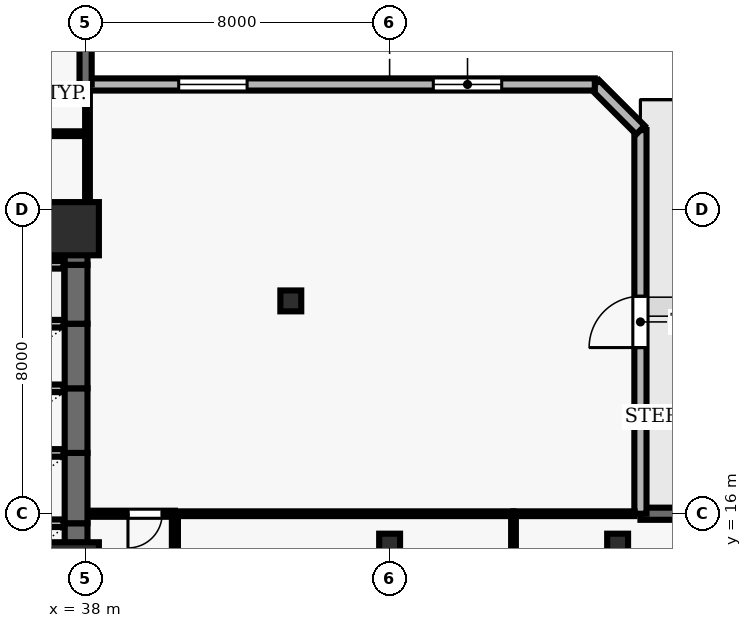
"""IFC4 building model, lengths in metres.
Left out: names, types, materials, properties, quantities, classifications, styles, units other than length and angle.
Written with IfcOpenShell. Run it as: python <this file> out.ifc"""

import sys

from ifc_helpers import new_model, si_unit, direction, frame, frame_2d, origin, origin_2d, place, context, subcontext, project, spatial, rectangle, hollow_rectangle, extrude, element, fill, save


model = new_model("IFC4")
c1 = context("Model", 3, precision=1e-05, world=origin(), true_north=direction((0.0, 1.0)))
c2 = subcontext(c1, "Body", "Model", "MODEL_VIEW")
j1 = project(units=[si_unit("LENGTHUNIT", "METRE"), si_unit("PLANEANGLEUNIT", "RADIAN")], contexts=[c1])
p1 = place(None, origin())
s1 = spatial("IfcSite", under=j1, at=p1, CompositionType="ELEMENT")
p2 = place(p1, origin())
s2 = spatial("IfcBuilding", under=s1, at=p2, CompositionType="ELEMENT")
p3 = place(p2, frame((0.0, 0.0, 50.5)))
s3 = spatial("IfcBuildingStorey", under=s2, at=p3, CompositionType="ELEMENT", Elevation=50.5)
for number, where, z_axis, x_axis in (
    (1, (37.65, 14.55, 0.0), (0.0, 0.0, 1.0), (1.0, 0.0, 0.0)),
    (2, (37.65, 23.5, 0.0), (0.0, 0.0, 1.0), (1.0, 0.0, 0.0)),
):
    element("IfcColumn", number, at=place(p3, frame(where, z_axis=z_axis, x_axis=x_axis)), inside=s3, PredefinedType="COLUMN", context=c2, shape_type="SweptSolid", body=[
        extrude(rectangle(XDim=1.4, YDim=1.4, at=origin_2d()), origin(), (0.0, 0.0, 1.0), 3.9),
    ])
for number, where, z_axis, x_axis in (
    (3, (46.0, 15.2, 0.0), (0.0, 0.0, 1.0), (1.0, 0.0, 0.0)),
    (4, (52.0, 15.2, 0.0), (0.0, 0.0, 1.0), (1.0, 0.0, 0.0)),
    (5, (43.4, 21.6, 0.0), (0.0, 0.0, 1.0), (1.0, 0.0, 0.0)),
):
    element("IfcColumn", number, at=place(p3, frame(where, z_axis=z_axis, x_axis=x_axis)), inside=s3, PredefinedType="COLUMN", context=c2, shape_type="SweptSolid", body=[
        extrude(hollow_rectangle(XDim=0.55, YDim=0.55, WallThickness=0.025, at=origin_2d()), origin(), (0.0, 0.0, 1.0), 3.9),
    ])
p4 = place(p3, frame((73.5, 16.0, 0.0), z_axis=(0.0, 0.0, 1.0), x_axis=(-1.0, 0.0, 0.0)))
e6 = element("IfcWall", 6, at=p4, inside=s3, PredefinedType="SOLIDWALL", context=c2, shape_type="SweptSolid", body=[
    extrude(rectangle(XDim=20.9, YDim=0.32, at=frame_2d((10.45, 0.0))), origin(), (0.0, 0.0, 1.0), 3.69),
])
p5 = place(p4, frame((6.925, 0.0, 0.0)))
e7 = element("IfcOpeningElement", 7, at=p5, cuts=e6, PredefinedType="OPENING", context=c2, shape_type="SweptSolid", body=[
    extrude(rectangle(XDim=1.0, YDim=2.2, at=frame_2d((0.5, 1.1))), frame((0.0, 0.17, 0.0), z_axis=(0.0, -1.0, 0.0), x_axis=(1.0, 0.0, 0.0)), (0.0, 0.0, 1.0), 0.34),
])
p6 = place(p4, frame((1.983, 0.0, 0.9)))
e8 = element("IfcOpeningElement", 8, at=p6, cuts=e6, PredefinedType="OPENING", context=c2, shape_type="SweptSolid", body=[
    extrude(rectangle(XDim=2.1, YDim=1.6, at=frame_2d((1.05, 0.8))), frame((0.0, 0.17, 0.0), z_axis=(0.0, -1.0, 0.0), x_axis=(1.0, 0.0, 0.0)), (0.0, 0.0, 1.0), 0.34),
])
p7 = place(p4, frame((16.367, 0.0, 0.9)))
e9 = element("IfcOpeningElement", 9, at=p7, cuts=e6, PredefinedType="OPENING", context=c2, shape_type="SweptSolid", body=[
    extrude(rectangle(XDim=2.1, YDim=1.6, at=frame_2d((1.05, 0.8))), frame((0.0, 0.17, 0.0), z_axis=(0.0, -1.0, 0.0), x_axis=(1.0, 0.0, 0.0)), (0.0, 0.0, 1.0), 0.34),
])
p8 = place(p3, frame((52.6, 16.0, 0.0), z_axis=(0.0, 0.0, 1.0), x_axis=(0.0, 1.0, 0.0)))
e10 = element("IfcWall", 10, at=p8, inside=s3, PredefinedType="SOLIDWALL", context=c2, shape_type="SweptSolid", body=[
    extrude(rectangle(XDim=10.095, YDim=0.32, at=frame_2d((5.047, 0.0))), origin(), (0.0, 0.0, 1.0), 3.69),
])
p9 = place(p8, frame((4.372, 0.0, 0.0)))
e11 = element("IfcOpeningElement", 11, at=p9, cuts=e10, PredefinedType="OPENING", context=c2, shape_type="SweptSolid", body=[
    extrude(rectangle(XDim=1.35, YDim=2.2, at=frame_2d((0.675, 1.1))), frame((0.0, 0.17, 0.0), z_axis=(0.0, -1.0, 0.0), x_axis=(1.0, 0.0, 0.0)), (0.0, 0.0, 1.0), 0.34),
])
p10 = place(p3, frame((52.6, 26.095, 0.0), z_axis=(0.0, 0.0, 1.0), x_axis=(-0.707178703759, 0.707034851297, 0.0)))
e12 = element("IfcWall", 12, at=p10, inside=s3, PredefinedType="SOLIDWALL", context=c2, shape_type="SweptSolid", body=[
    extrude(rectangle(XDim=1.697, YDim=0.32, at=frame_2d((0.849, 0.0))), origin(), (0.0, 0.0, 1.0), 3.69),
])
p11 = place(p3, frame((51.4, 27.295, 0.0), z_axis=(0.0, 0.0, 1.0), x_axis=(-1.0, 0.0, 0.0)))
e13 = element("IfcWall", 13, at=p11, inside=s3, PredefinedType="SOLIDWALL", context=c2, shape_type="SweptSolid", body=[
    extrude(rectangle(XDim=13.4, YDim=0.32, at=frame_2d((6.7, 0.0))), origin(), (0.0, 0.0, 1.0), 3.69),
])
p12 = place(p11, frame((2.45, 0.0, 0.9)))
e14 = element("IfcOpeningElement", 14, at=p12, cuts=e13, PredefinedType="OPENING", context=c2, shape_type="SweptSolid", body=[
    extrude(rectangle(XDim=1.8, YDim=1.8, at=frame_2d((0.9, 0.9))), frame((0.0, 0.17, 0.0), z_axis=(0.0, -1.0, 0.0), x_axis=(1.0, 0.0, 0.0)), (0.0, 0.0, 1.0), 0.34),
])
p13 = place(p11, frame((9.15, 0.0, 0.9)))
e15 = element("IfcOpeningElement", 15, at=p13, cuts=e13, PredefinedType="OPENING", context=c2, shape_type="SweptSolid", body=[
    extrude(rectangle(XDim=1.8, YDim=1.8, at=frame_2d((0.9, 0.9))), frame((0.0, 0.17, 0.0), z_axis=(0.0, -1.0, 0.0), x_axis=(1.0, 0.0, 0.0)), (0.0, 0.0, 1.0), 0.34),
])
p14 = place(p3, frame((38.0, 27.295, 0.0), z_axis=(0.0, 0.0, 1.0), x_axis=(0.0, 1.0, 0.0)))
e16 = element("IfcWall", 16, at=p14, inside=s3, PredefinedType="SOLIDWALL", context=c2, shape_type="SweptSolid", body=[
    extrude(rectangle(XDim=24.205, YDim=0.32, at=frame_2d((12.103, 0.0))), origin(), (0.0, 0.0, 1.0), 3.69),
])
p15 = place(p14, frame((16.628, 0.0, 0.0)))
e17 = element("IfcOpeningElement", 17, at=p15, cuts=e16, PredefinedType="OPENING", context=c2, shape_type="SweptSolid", body=[
    extrude(rectangle(XDim=1.0, YDim=2.2, at=frame_2d((0.5, 1.1))), frame((0.0, 0.17, 0.0), z_axis=(0.0, -1.0, 0.0), x_axis=(1.0, 0.0, 0.0)), (0.0, 0.0, 1.0), 0.34),
])
p16 = place(p14, frame((19.979, 0.0, 0.9)))
e18 = element("IfcOpeningElement", 18, at=p16, cuts=e16, PredefinedType="OPENING", context=c2, shape_type="SweptSolid", body=[
    extrude(rectangle(XDim=2.4, YDim=1.8, at=frame_2d((1.2, 0.9))), frame((0.0, 0.17, 0.0), z_axis=(0.0, -1.0, 0.0), x_axis=(1.0, 0.0, 0.0)), (0.0, 0.0, 1.0), 0.34),
])
p17 = place(p3, frame((37.75, 13.9, 0.0), z_axis=(0.0, 0.0, 1.0), x_axis=(0.0, 1.0, 0.0)))
e19 = element("IfcWall", 19, at=p17, inside=s3, PredefinedType="SHEAR", context=c2, shape_type="SweptSolid", body=[
    extrude(rectangle(XDim=1.85, YDim=0.6, at=frame_2d((0.925, 0.0))), origin(), (0.0, 0.0, 1.0), 3.69),
])
p18 = place(p3, frame((37.42, 15.75, 0.0), z_axis=(0.0, 0.0, 1.0), x_axis=(-1.0, 0.0, 0.0)))
e20 = element("IfcWall", 20, at=p18, inside=s3, PredefinedType="SOLIDWALL", context=c2, shape_type="SweptSolid", body=[
    extrude(rectangle(XDim=2.14, YDim=0.2, at=frame_2d((1.07, 0.0))), origin(), (0.0, 0.0, 1.0), 3.69),
])
p19 = place(p3, frame((37.75, 15.75, 0.0), z_axis=(0.0, 0.0, 1.0), x_axis=(0.0, 1.0, 0.0)))
e21 = element("IfcWall", 21, at=p19, inside=s3, PredefinedType="SHEAR", context=c2, shape_type="SweptSolid", body=[
    extrude(rectangle(XDim=1.85, YDim=0.6, at=frame_2d((0.925, 0.0))), origin(), (0.0, 0.0, 1.0), 3.69),
])
p20 = place(p3, frame((37.42, 17.6, 0.0), z_axis=(0.0, 0.0, 1.0), x_axis=(-1.0, 0.0, 0.0)))
e22 = element("IfcWall", 22, at=p20, inside=s3, PredefinedType="SOLIDWALL", context=c2, shape_type="SweptSolid", body=[
    extrude(rectangle(XDim=2.14, YDim=0.2, at=frame_2d((1.07, 0.0))), origin(), (0.0, 0.0, 1.0), 3.69),
])
p21 = place(p3, frame((37.75, 17.6, 0.0), z_axis=(0.0, 0.0, 1.0), x_axis=(0.0, 1.0, 0.0)))
e23 = element("IfcWall", 23, at=p21, inside=s3, PredefinedType="SHEAR", context=c2, shape_type="SweptSolid", body=[
    extrude(rectangle(XDim=1.7, YDim=0.6, at=frame_2d((0.85, 0.0))), origin(), (0.0, 0.0, 1.0), 3.69),
])
p22 = place(p3, frame((37.42, 19.3, 0.0), z_axis=(0.0, 0.0, 1.0), x_axis=(-1.0, 0.0, 0.0)))
e24 = element("IfcWall", 24, at=p22, inside=s3, PredefinedType="SOLIDWALL", context=c2, shape_type="SweptSolid", body=[
    extrude(rectangle(XDim=2.14, YDim=0.2, at=frame_2d((1.07, 0.0))), origin(), (0.0, 0.0, 1.0), 3.69),
])
p23 = place(p3, frame((37.75, 19.3, 0.0), z_axis=(0.0, 0.0, 1.0), x_axis=(0.0, 1.0, 0.0)))
e25 = element("IfcWall", 25, at=p23, inside=s3, PredefinedType="SHEAR", context=c2, shape_type="SweptSolid", body=[
    extrude(rectangle(XDim=1.7, YDim=0.6, at=frame_2d((0.85, 0.0))), origin(), (0.0, 0.0, 1.0), 3.69),
])
p24 = place(p3, frame((37.42, 21.0, 0.0), z_axis=(0.0, 0.0, 1.0), x_axis=(-1.0, 0.0, 0.0)))
e26 = element("IfcWall", 26, at=p24, inside=s3, PredefinedType="SOLIDWALL", context=c2, shape_type="SweptSolid", body=[
    extrude(rectangle(XDim=2.14, YDim=0.2, at=frame_2d((1.07, 0.0))), origin(), (0.0, 0.0, 1.0), 3.69),
])
p25 = place(p3, frame((37.75, 21.0, 0.0), z_axis=(0.0, 0.0, 1.0), x_axis=(0.0, 1.0, 0.0)))
e27 = element("IfcWall", 27, at=p25, inside=s3, PredefinedType="SHEAR", context=c2, shape_type="SweptSolid", body=[
    extrude(rectangle(XDim=1.55, YDim=0.6, at=frame_2d((0.775, 0.0))), origin(), (0.0, 0.0, 1.0), 3.69),
])
p26 = place(p3, frame((37.42, 22.55, 0.0), z_axis=(0.0, 0.0, 1.0), x_axis=(-1.0, 0.0, 0.0)))
e28 = element("IfcWall", 28, at=p26, inside=s3, PredefinedType="SOLIDWALL", context=c2, shape_type="SweptSolid", body=[
    extrude(rectangle(XDim=2.14, YDim=0.2, at=frame_2d((1.07, 0.0))), origin(), (0.0, 0.0, 1.0), 3.69),
])
p27 = place(p3, frame((37.75, 22.55, 0.0), z_axis=(0.0, 0.0, 1.0), x_axis=(0.0, 1.0, 0.0)))
e29 = element("IfcWall", 29, at=p27, inside=s3, PredefinedType="SHEAR", context=c2, shape_type="SweptSolid", body=[
    extrude(rectangle(XDim=1.5, YDim=0.6, at=frame_2d((0.75, 0.0))), origin(), (0.0, 0.0, 1.0), 3.69),
])
p28 = place(p3, frame((37.42, 24.05, 0.0), z_axis=(0.0, 0.0, 1.0), x_axis=(-1.0, 0.0, 0.0)))
e30 = element("IfcWall", 30, at=p28, inside=s3, PredefinedType="SOLIDWALL", context=c2, shape_type="SweptSolid", body=[
    extrude(rectangle(XDim=2.14, YDim=0.2, at=frame_2d((1.07, 0.0))), origin(), (0.0, 0.0, 1.0), 3.69),
])
p29 = place(p3, frame((35.15, 26.0, 0.0), z_axis=(0.0, 0.0, 1.0), x_axis=(1.0, 0.0, 0.0)))
e31 = element("IfcWall", 31, at=p29, inside=s3, PredefinedType="PARTITIONING", context=c2, shape_type="SweptSolid", body=[
    extrude(rectangle(XDim=2.7, YDim=0.125, at=frame_2d((1.35, 0.0))), origin(), (0.0, 0.0, 1.0), 3.69),
])
p30 = place(p3, frame((40.35, 16.0, 0.0), z_axis=(0.0, 0.0, 1.0), x_axis=(-1.0, 0.0, 0.0)))
e32 = element("IfcWall", 32, at=p30, inside=s3, PredefinedType="PARTITIONING", context=c2, shape_type="SweptSolid", body=[
    extrude(rectangle(XDim=2.27, YDim=0.16, at=frame_2d((1.135, 0.0))), origin(), (0.0, 0.0, 1.0), 3.69),
])
p31 = place(p30, frame((0.335, 0.0, 0.0)))
e33 = element("IfcOpeningElement", 33, at=p31, cuts=e32, PredefinedType="OPENING", context=c2, shape_type="SweptSolid", body=[
    extrude(rectangle(XDim=0.9, YDim=2.1, at=frame_2d((0.45, 1.05))), frame((0.0, 0.09, 0.0), z_axis=(0.0, -1.0, 0.0), x_axis=(1.0, 0.0, 0.0)), (0.0, 0.0, 1.0), 0.18),
])
p32 = place(p3, frame((49.26, 16.0, 0.0), z_axis=(0.0, 0.0, 1.0), x_axis=(1.0, 0.0, 0.0)))
e34 = element("IfcWall", 34, at=p32, inside=s3, PredefinedType="PARTITIONING", context=c2, shape_type="SweptSolid", body=[
    extrude(rectangle(XDim=3.185, YDim=0.125, at=frame_2d((1.593, 0.0))), origin(), (0.0, 0.0, 1.0), 3.39),
])
p33 = place(p3, frame((49.26, 16.0, 0.0), z_axis=(0.0, 0.0, 1.0), x_axis=(-1.0, 0.0, 0.0)))
e35 = element("IfcWall", 35, at=p33, inside=s3, PredefinedType="PARTITIONING", context=c2, shape_type="SweptSolid", body=[
    extrude(rectangle(XDim=8.91, YDim=0.125, at=frame_2d((4.455, 0.0))), origin(), (0.0, 0.0, 1.0), 3.69),
])
p34 = place(p3, frame((38.05, 27.14, 0.0), z_axis=(0.0, 0.0, 1.0), x_axis=(0.0, -1.0, 0.0)))
e36 = element("IfcWall", 36, at=p34, inside=s3, PredefinedType="PARTITIONING", context=c2, shape_type="SweptSolid", body=[
    extrude(rectangle(XDim=3.09, YDim=0.125, at=frame_2d((1.545, 0.0))), origin(), (0.0, 0.0, 1.0), 3.055),
])
p35 = place(p3, frame((40.35, 10.425, 0.0), z_axis=(0.0, 0.0, 1.0), x_axis=(0.0, 1.0, 0.0)))
e37 = element("IfcWall", 37, at=p35, inside=s3, PredefinedType="PARTITIONING", context=c2, shape_type="SweptSolid", body=[
    extrude(rectangle(XDim=5.5, YDim=0.16, at=frame_2d((2.75, 0.0))), origin(), (0.0, 0.0, 1.0), 3.277),
])
p36 = place(p3, frame((49.26, 10.425, 0.0), z_axis=(0.0, 0.0, 1.0), x_axis=(0.0, 1.0, 0.0)))
e38 = element("IfcWall", 38, at=p36, inside=s3, PredefinedType="PARTITIONING", context=c2, shape_type="SweptSolid", body=[
    extrude(rectangle(XDim=5.518, YDim=0.125, at=frame_2d((2.759, 0.0))), origin(), (0.0, 0.0, 1.0), 3.69),
])
p37 = place(p9, origin())
e39 = element("IfcDoor", 39, at=p37, inside=s3, OperationType="SINGLE_SWING_LEFT", PredefinedType="DOOR", context=c2, shape_type="SweptSolid", body=[
    extrude(rectangle(XDim=1.35, YDim=2.2, at=frame_2d((0.675, 1.1))), frame((0.0, 0.025, 0.0), z_axis=(0.0, -1.0, 0.0), x_axis=(1.0, 0.0, 0.0)), (0.0, 0.0, 1.0), 0.05),
])
fill(e11, e39)
p38 = place(p12, origin())
e40 = element("IfcWindow", 40, at=p38, inside=s3, PartitioningType="SINGLE_PANEL", PredefinedType="WINDOW", context=c2, shape_type="SweptSolid", body=[
    extrude(rectangle(XDim=1.8, YDim=1.8, at=frame_2d((0.9, 0.9))), frame((0.0, 0.03, 0.0), z_axis=(0.0, -1.0, 0.0), x_axis=(1.0, 0.0, 0.0)), (0.0, 0.0, 1.0), 0.06),
])
fill(e14, e40)
p39 = place(p13, origin())
e41 = element("IfcWindow", 41, at=p39, inside=s3, PartitioningType="SINGLE_PANEL", PredefinedType="WINDOW", context=c2, shape_type="SweptSolid", body=[
    extrude(rectangle(XDim=1.8, YDim=1.8, at=frame_2d((0.9, 0.9))), frame((0.0, 0.03, 0.0), z_axis=(0.0, -1.0, 0.0), x_axis=(1.0, 0.0, 0.0)), (0.0, 0.0, 1.0), 0.06),
])
fill(e15, e41)
p40 = place(p31, origin())
e42 = element("IfcDoor", 42, at=p40, inside=s3, OperationType="SINGLE_SWING_RIGHT", PredefinedType="DOOR", context=c2, shape_type="SweptSolid", body=[
    extrude(rectangle(XDim=0.9, YDim=2.1, at=frame_2d((0.45, 1.05))), frame((0.0, 0.025, 0.0), z_axis=(0.0, -1.0, 0.0), x_axis=(1.0, 0.0, 0.0)), (0.0, 0.0, 1.0), 0.05),
])
fill(e33, e42)
save(model, sys.argv[1])
